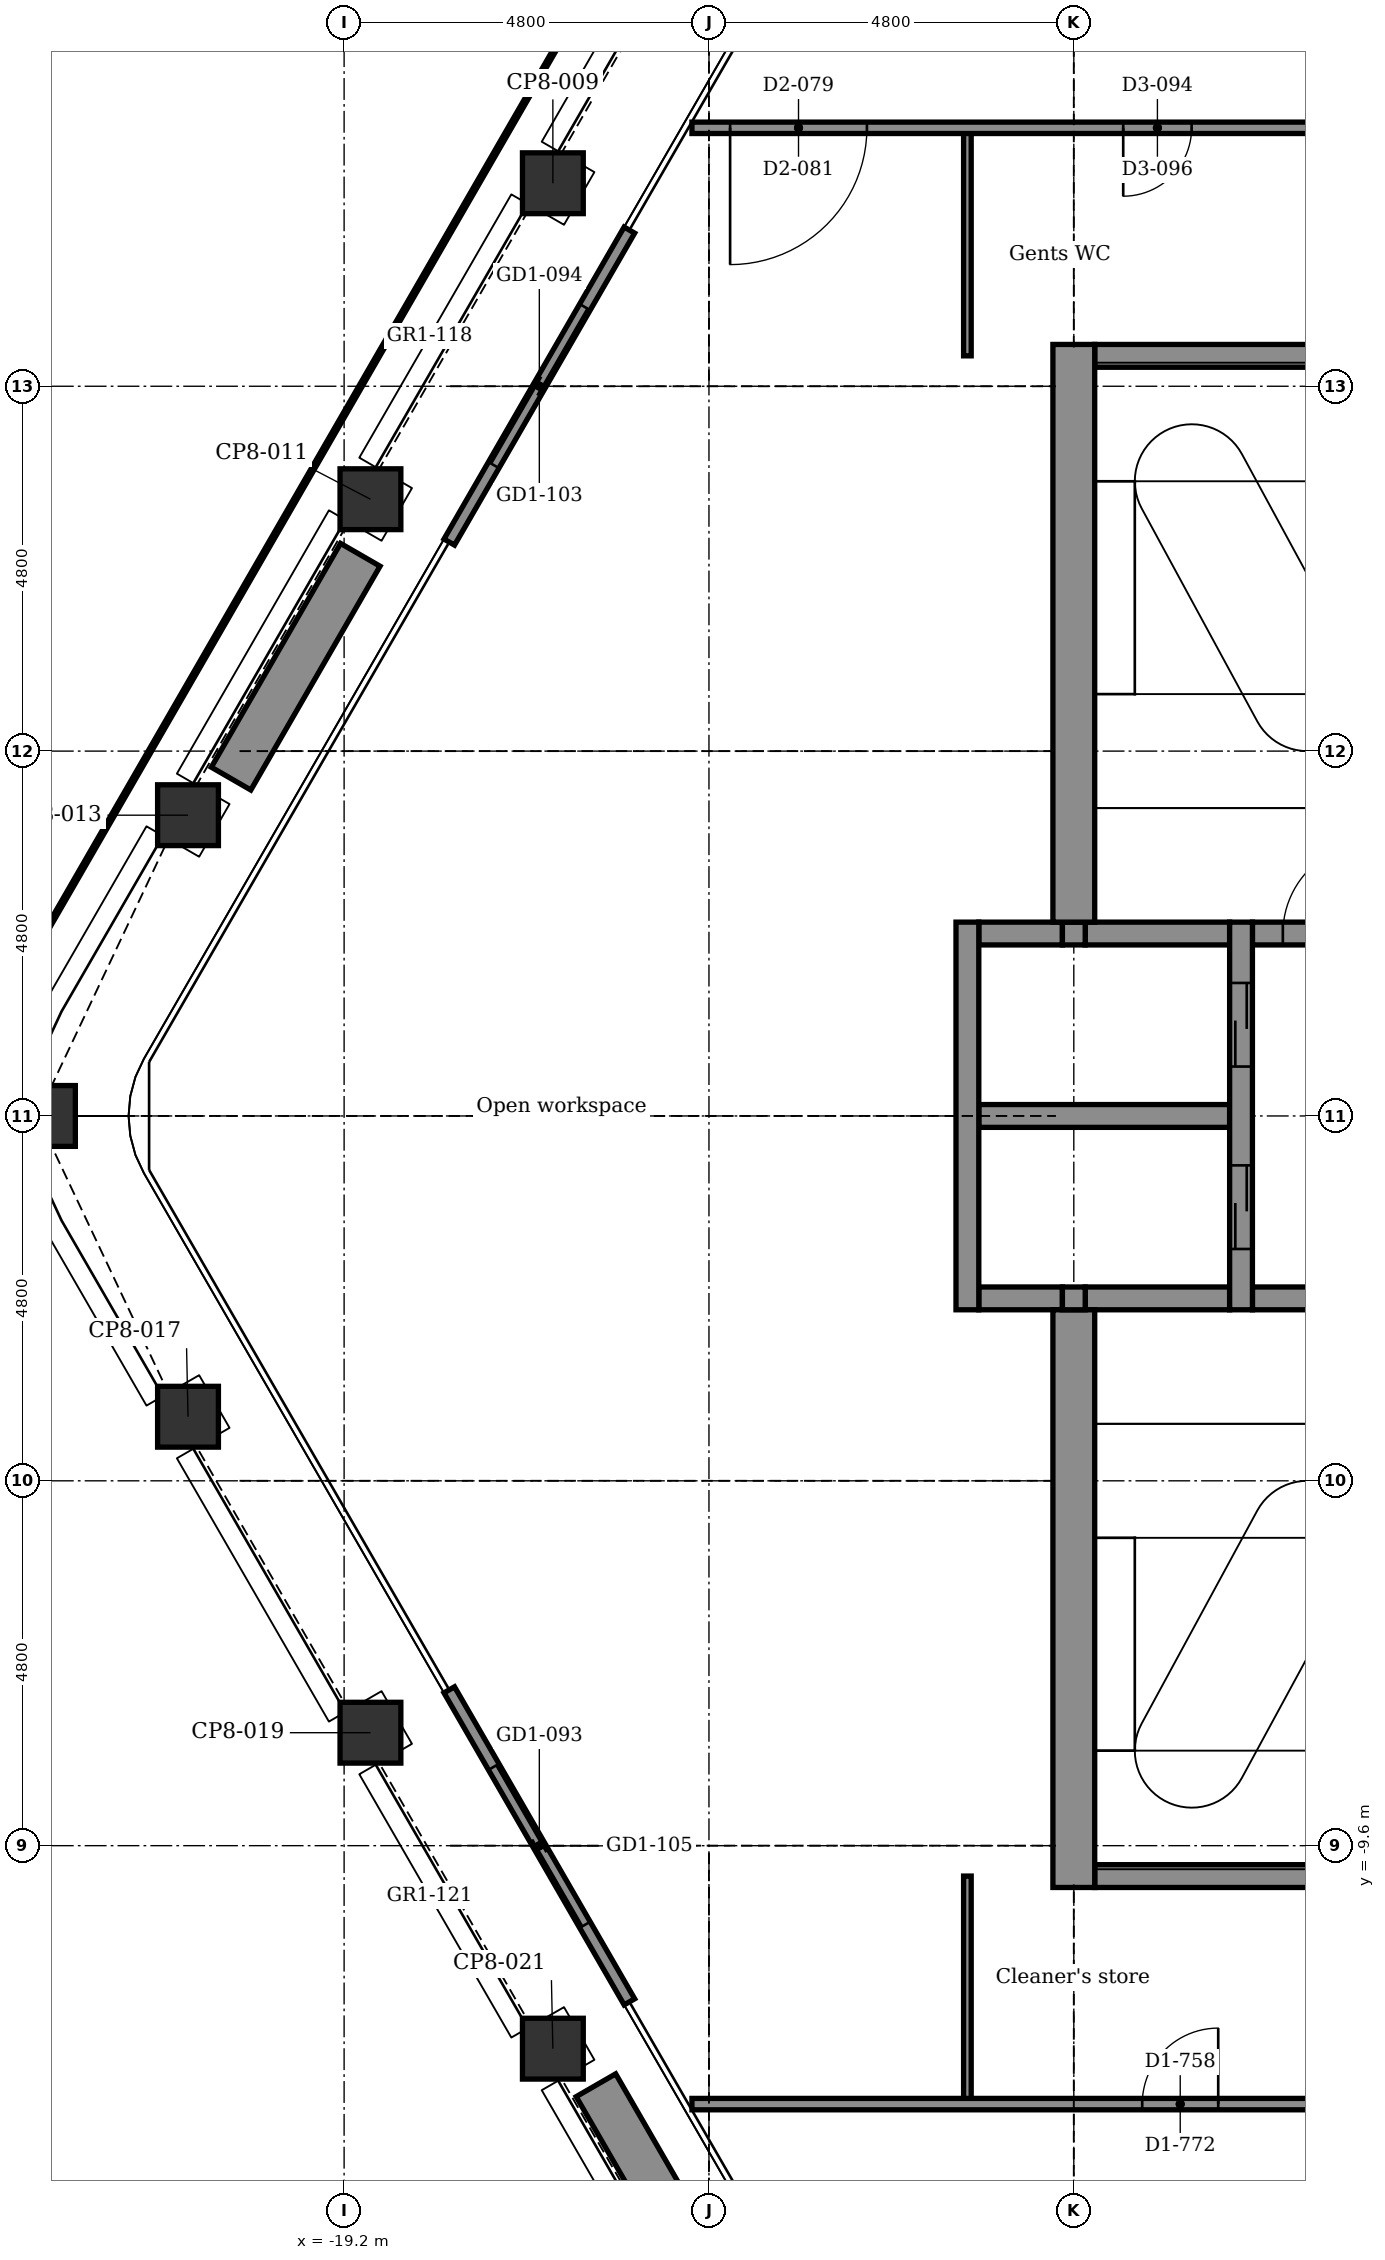
"""IFC4 building model, lengths in metres.
Left out: names, types, materials, properties, quantities, classifications, styles, units other than length and angle.
Written with IfcOpenShell. Run it as: python <this file> out.ifc"""

import sys

from ifc_helpers import new_model, si_unit, direction, frame, frame_2d, origin, origin_2d, place, context, subcontext, project, spatial, rectangle, extrude, element, fill, save


model = new_model("IFC4")
c1 = context("Model", 3, precision=1e-05, world=origin(), true_north=direction((0.0, 1.0)))
c2 = subcontext(c1, "Body", "Model", "MODEL_VIEW")
j1 = project(units=[si_unit("LENGTHUNIT", "METRE"), si_unit("PLANEANGLEUNIT", "RADIAN")], contexts=[c1])
p1 = place(None, origin())
s1 = spatial("IfcSite", under=j1, at=p1, CompositionType="ELEMENT")
p2 = place(p1, origin())
s2 = spatial("IfcBuilding", under=s1, at=p2, CompositionType="ELEMENT")
p3 = place(p2, frame((0.0, 0.0, 289.1)))
s3 = spatial("IfcBuildingStorey", under=s2, at=p3, CompositionType="ELEMENT", Elevation=289.1)
for number, where, z_axis, x_axis in (
    (1, (-16.454, -12.271, -0.15), (0.0, 0.0, 1.0), (0.866, 0.5, 0.0)),
    (2, (-18.854, -8.114, -0.15), (0.0, 0.0, 1.0), (0.866, 0.5, 0.0)),
    (3, (-21.254, -3.957, -0.15), (0.0, 0.0, 1.0), (0.866, 0.5, 0.0)),
    (4, (-23.136, 0.0, -0.15), (0.0, 0.0, 1.0), (1.0, 0.0, 0.0)),
    (5, (-21.254, 3.957, -0.15), (0.0, 0.0, 1.0), (0.5, 0.866, 0.0)),
    (6, (-18.854, 8.114, -0.15), (0.0, 0.0, 1.0), (0.5, 0.866, 0.0)),
    (7, (-16.454, 12.271, -0.15), (0.0, 0.0, 1.0), (0.5, 0.866, 0.0)),
):
    element("IfcColumn", number, at=place(p3, frame(where, z_axis=z_axis, x_axis=x_axis)), inside=s3, PredefinedType="COLUMN", context=c2, shape_type="SweptSolid", body=[
        extrude(rectangle(XDim=0.8, YDim=0.8, at=origin_2d()), origin(), (0.0, 0.0, 1.0), 3.9),
    ])
p4 = place(p3, frame((-9.325, -10.0, -0.15), z_axis=(0.0, 0.0, 1.0), x_axis=(1.0, 0.0, 0.0)))
e8 = element("IfcWall", 8, at=p4, inside=s3, PredefinedType="STANDARD", context=c2, shape_type="SweptSolid", body=[
    extrude(rectangle(XDim=4.075, YDim=0.3, at=frame_2d((2.038, 0.0))), origin(), (0.0, 0.0, 1.0), 3.9),
])
p5 = place(p3, frame((-10.85, -2.4, -0.15), z_axis=(0.0, 0.0, 1.0), x_axis=(1.0, 0.0, 0.0)))
e9 = element("IfcWall", 9, at=p5, inside=s3, PredefinedType="STANDARD", context=c2, shape_type="SweptSolid", body=[
    extrude(rectangle(XDim=1.1, YDim=0.3, at=frame_2d((0.55, 0.0))), origin(), (0.0, 0.0, 1.0), 3.9),
])
p6 = place(p3, frame((-9.45, -2.4, -0.15), z_axis=(0.0, 0.0, 1.0), x_axis=(1.0, 0.0, 0.0)))
e10 = element("IfcWall", 10, at=p6, inside=s3, PredefinedType="STANDARD", context=c2, shape_type="SweptSolid", body=[
    extrude(rectangle(XDim=1.9, YDim=0.3, at=frame_2d((0.95, 0.0))), origin(), (0.0, 0.0, 1.0), 3.9),
])
p7 = place(p3, frame((-7.25, -2.4, -0.15), z_axis=(0.0, 0.0, 1.0), x_axis=(1.0, 0.0, 0.0)))
e11 = element("IfcWall", 11, at=p7, inside=s3, PredefinedType="STANDARD", context=c2, shape_type="SweptSolid", body=[
    extrude(rectangle(XDim=2.0, YDim=0.3, at=frame_2d((1.0, 0.0))), origin(), (0.0, 0.0, 1.0), 3.9),
])
p8 = place(p3, frame((-10.85, 0.0, -0.15), z_axis=(0.0, 0.0, 1.0), x_axis=(1.0, 0.0, 0.0)))
e12 = element("IfcWall", 12, at=p8, inside=s3, PredefinedType="STANDARD", context=c2, shape_type="SweptSolid", body=[
    extrude(rectangle(XDim=3.3, YDim=0.3, at=frame_2d((1.65, 0.0))), origin(), (0.0, 0.0, 1.0), 3.9),
])
p9 = place(p3, frame((-10.85, 2.4, -0.15), z_axis=(0.0, 0.0, 1.0), x_axis=(1.0, 0.0, 0.0)))
e13 = element("IfcWall", 13, at=p9, inside=s3, PredefinedType="STANDARD", context=c2, shape_type="SweptSolid", body=[
    extrude(rectangle(XDim=1.1, YDim=0.3, at=frame_2d((0.55, 0.0))), origin(), (0.0, 0.0, 1.0), 3.9),
])
p10 = place(p3, frame((-9.45, 2.4, -0.15), z_axis=(0.0, 0.0, 1.0), x_axis=(1.0, 0.0, 0.0)))
e14 = element("IfcWall", 14, at=p10, inside=s3, PredefinedType="STANDARD", context=c2, shape_type="SweptSolid", body=[
    extrude(rectangle(XDim=1.9, YDim=0.3, at=frame_2d((0.95, 0.0))), origin(), (0.0, 0.0, 1.0), 3.9),
])
p11 = place(p3, frame((-7.25, 2.4, -0.15), z_axis=(0.0, 0.0, 1.0), x_axis=(1.0, 0.0, 0.0)))
e15 = element("IfcWall", 15, at=p11, inside=s3, PredefinedType="STANDARD", context=c2, shape_type="SweptSolid", body=[
    extrude(rectangle(XDim=2.0, YDim=0.3, at=frame_2d((1.0, 0.0))), origin(), (0.0, 0.0, 1.0), 3.9),
])
p12 = place(p11, frame((0.4, 0.0, 0.15)))
e16 = element("IfcOpeningElement", 16, at=p12, cuts=e15, PredefinedType="OPENING", context=c2, shape_type="SweptSolid", body=[
    extrude(rectangle(XDim=1.2, YDim=2.1, at=frame_2d((0.6, 1.05))), frame((0.0, 0.16, 0.0), z_axis=(0.0, -1.0, 0.0), x_axis=(1.0, 0.0, 0.0)), (0.0, 0.0, 1.0), 0.32),
])
p13 = place(p3, frame((-9.325, 10.0, -0.15), z_axis=(0.0, 0.0, 1.0), x_axis=(1.0, 0.0, 0.0)))
e17 = element("IfcWall", 17, at=p13, inside=s3, PredefinedType="STANDARD", context=c2, shape_type="SweptSolid", body=[
    extrude(rectangle(XDim=4.075, YDim=0.3, at=frame_2d((2.038, 0.0))), origin(), (0.0, 0.0, 1.0), 3.9),
])
p14 = place(p3, frame((-11.0, -2.55, -0.15), z_axis=(0.0, 0.0, 1.0), x_axis=(0.0, 1.0, 0.0)))
e18 = element("IfcWall", 18, at=p14, inside=s3, PredefinedType="STANDARD", context=c2, shape_type="SweptSolid", body=[
    extrude(rectangle(XDim=5.1, YDim=0.3, at=frame_2d((2.55, 0.0))), origin(), (0.0, 0.0, 1.0), 3.9),
])
p15 = place(p3, frame((-9.6, -10.15, -0.15), z_axis=(0.0, 0.0, 1.0), x_axis=(0.0, 1.0, 0.0)))
e19 = element("IfcWall", 19, at=p15, inside=s3, PredefinedType="SHEAR", context=c2, shape_type="SweptSolid", body=[
    extrude(rectangle(XDim=7.6, YDim=0.55, at=frame_2d((3.8, 0.0))), origin(), (0.0, 0.0, 1.0), 3.9),
])
for number, where, z_axis, x_axis in (
    (20, (-9.6, -2.55, -0.15), (0.0, 0.0, 1.0), (0.0, 1.0, 0.0)),
    (21, (-9.6, 2.25, -0.15), (0.0, 0.0, 1.0), (0.0, 1.0, 0.0)),
):
    element("IfcWall", number, at=place(p3, frame(where, z_axis=z_axis, x_axis=x_axis)), inside=s3, PredefinedType="STANDARD", context=c2, shape_type="SweptSolid", body=[
        extrude(rectangle(XDim=0.3, YDim=0.3, at=frame_2d((0.15, 0.0))), origin(), (0.0, 0.0, 1.0), 3.9),
    ])
p16 = place(p3, frame((-9.6, 2.55, -0.15), z_axis=(0.0, 0.0, 1.0), x_axis=(0.0, 1.0, 0.0)))
e22 = element("IfcWall", 22, at=p16, inside=s3, PredefinedType="SHEAR", context=c2, shape_type="SweptSolid", body=[
    extrude(rectangle(XDim=7.6, YDim=0.55, at=frame_2d((3.8, 0.0))), origin(), (0.0, 0.0, 1.0), 3.9),
])
p17 = place(p3, frame((-7.4, -2.55, -0.15), z_axis=(0.0, 0.0, 1.0), x_axis=(0.0, 1.0, 0.0)))
e23 = element("IfcWall", 23, at=p17, inside=s3, PredefinedType="STANDARD", context=c2, shape_type="SweptSolid", body=[
    extrude(rectangle(XDim=5.1, YDim=0.3, at=frame_2d((2.55, 0.0))), origin(), (0.0, 0.0, 1.0), 3.9),
])
p18 = place(p17, frame((0.8, 0.0, 0.15)))
e24 = element("IfcOpeningElement", 24, at=p18, cuts=e23, PredefinedType="OPENING", context=c2, shape_type="SweptSolid", body=[
    extrude(rectangle(XDim=1.1, YDim=2.1, at=frame_2d((0.55, 1.05))), frame((0.0, 0.16, 0.0), z_axis=(0.0, -1.0, 0.0), x_axis=(1.0, 0.0, 0.0)), (0.0, 0.0, 1.0), 0.32),
])
p19 = place(p17, frame((3.2, 0.0, 0.15)))
e25 = element("IfcOpeningElement", 25, at=p19, cuts=e23, PredefinedType="OPENING", context=c2, shape_type="SweptSolid", body=[
    extrude(rectangle(XDim=1.1, YDim=2.1, at=frame_2d((0.55, 1.05))), frame((0.0, 0.16, 0.0), z_axis=(0.0, -1.0, 0.0), x_axis=(1.0, 0.0, 0.0)), (0.0, 0.0, 1.0), 0.32),
])
p20 = place(p3, frame((-15.447, -11.655, 0.0), z_axis=(0.0, 0.0, 1.0), x_axis=(-0.499978080042, 0.866038058908, 0.0)))
e26 = element("IfcWall", 26, at=p20, inside=s3, PredefinedType="PARTITIONING", context=c2, shape_type="SweptSolid", body=[
    extrude(rectangle(XDim=4.74, YDim=0.16, at=frame_2d((2.37, 0.0))), origin(), (0.0, 0.0, 1.0), 3.75),
])
p21 = place(p20, frame((1.17, 0.0, 0.0)))
e27 = element("IfcOpeningElement", 27, at=p21, cuts=e26, PredefinedType="OPENING", context=c2, shape_type="SweptSolid", body=[
    extrude(rectangle(XDim=2.4, YDim=2.4, at=frame_2d((1.2, 1.2))), frame((0.0, 0.09, 0.0), z_axis=(0.0, -1.0, 0.0), x_axis=(1.0, 0.0, 0.0)), (0.0, 0.0, 1.0), 0.18),
])
p22 = place(p3, frame((-17.817, 7.55, 0.0), z_axis=(0.0, 0.0, 1.0), x_axis=(0.499978080042, 0.866038058908, 0.0)))
e28 = element("IfcWall", 28, at=p22, inside=s3, PredefinedType="PARTITIONING", context=c2, shape_type="SweptSolid", body=[
    extrude(rectangle(XDim=4.74, YDim=0.16, at=frame_2d((2.37, 0.0))), origin(), (0.0, 0.0, 1.0), 3.75),
])
p23 = place(p22, frame((1.17, 0.0, 0.0)))
e29 = element("IfcOpeningElement", 29, at=p23, cuts=e28, PredefinedType="OPENING", context=c2, shape_type="SweptSolid", body=[
    extrude(rectangle(XDim=2.4, YDim=2.4, at=frame_2d((1.2, 1.2))), frame((0.0, 0.09, 0.0), z_axis=(0.0, -1.0, 0.0), x_axis=(1.0, 0.0, 0.0)), (0.0, 0.0, 1.0), 0.18),
])
p24 = place(p3, frame((-14.187, -15.697, 0.0), z_axis=(0.0, 0.0, 1.0), x_axis=(-0.499977295307, 0.866038511948, 0.0)))
e30 = element("IfcWall", 30, at=p24, inside=s3, PredefinedType="USERDEFINED", context=c2, shape_type="SweptSolid", body=[
    extrude(rectangle(XDim=3.4, YDim=0.6, at=frame_2d((1.7, 0.0))), origin(), (0.0, 0.0, 1.0), 0.7),
])
p25 = place(p3, frame((-20.687, 4.438, 0.0), z_axis=(0.0, 0.0, 1.0), x_axis=(0.500008388397, 0.866020560687, 0.0)))
e31 = element("IfcWall", 31, at=p25, inside=s3, PredefinedType="USERDEFINED", context=c2, shape_type="SweptSolid", body=[
    extrude(rectangle(XDim=3.4, YDim=0.6, at=frame_2d((1.7, 0.0))), origin(), (0.0, 0.0, 1.0), 0.7),
])
for number, where, z_axis, x_axis in (
    (32, (-11.0, -13.0, 0.0), (0.0, 0.0, 1.0), (0.0, 1.0, 0.0)),
    (33, (-11.0, 10.0, 0.0), (0.0, 0.0, 1.0), (0.0, 1.0, 0.0)),
):
    element("IfcWall", number, at=place(p3, frame(where, z_axis=z_axis, x_axis=x_axis)), inside=s3, PredefinedType="PARTITIONING", context=c2, shape_type="SweptSolid", body=[
        extrude(rectangle(XDim=3.0, YDim=0.1, at=frame_2d((1.5, 0.0))), origin(), (0.0, 0.0, 1.0), 3.75),
    ])
p26 = place(p3, frame((-14.624, -13.0, 0.0), z_axis=(0.0, 0.0, 1.0), x_axis=(1.0, 0.0, 0.0)))
e34 = element("IfcWall", 34, at=p26, inside=s3, PredefinedType="PARTITIONING", context=c2, shape_type="SweptSolid", body=[
    extrude(rectangle(XDim=9.224, YDim=0.15, at=frame_2d((4.612, 0.0))), origin(), (0.0, 0.0, 1.0), 3.75),
])
p27 = place(p26, frame((5.924, 0.0, 0.0)))
e35 = element("IfcOpeningElement", 35, at=p27, cuts=e34, PredefinedType="OPENING", context=c2, shape_type="SweptSolid", body=[
    extrude(rectangle(XDim=1.0, YDim=2.1, at=frame_2d((0.5, 1.05))), frame((0.0, 0.085, 0.0), z_axis=(0.0, -1.0, 0.0), x_axis=(1.0, 0.0, 0.0)), (0.0, 0.0, 1.0), 0.17),
])
p28 = place(p3, frame((-14.624, 13.0, 0.0), z_axis=(0.0, 0.0, 1.0), x_axis=(1.0, 0.0, 0.0)))
e36 = element("IfcWall", 36, at=p28, inside=s3, PredefinedType="PARTITIONING", context=c2, shape_type="SweptSolid", body=[
    extrude(rectangle(XDim=8.624, YDim=0.15, at=frame_2d((4.312, 0.0))), origin(), (0.0, 0.0, 1.0), 3.75),
])
p29 = place(p28, frame((5.674, 0.0, 0.0)))
e37 = element("IfcOpeningElement", 37, at=p29, cuts=e36, PredefinedType="OPENING", context=c2, shape_type="SweptSolid", body=[
    extrude(rectangle(XDim=0.9, YDim=2.1, at=frame_2d((0.45, 1.05))), frame((0.0, 0.085, 0.0), z_axis=(0.0, -1.0, 0.0), x_axis=(1.0, 0.0, 0.0)), (0.0, 0.0, 1.0), 0.17),
])
p30 = place(p28, frame((0.502, 0.0, 0.0)))
e38 = element("IfcOpeningElement", 38, at=p30, cuts=e36, PredefinedType="OPENING", context=c2, shape_type="SweptSolid", body=[
    extrude(rectangle(XDim=1.8, YDim=2.1, at=frame_2d((0.9, 1.05))), frame((0.0, 0.085, 0.0), z_axis=(0.0, -1.0, 0.0), x_axis=(1.0, 0.0, 0.0)), (0.0, 0.0, 1.0), 0.17),
])
p31 = place(p21, origin())
e39 = element("IfcDoor", 39, at=p31, inside=s3, OperationType="DOUBLE_DOOR_SLIDING", PredefinedType="DOOR", context=c2, shape_type="SweptSolid", body=[
    extrude(rectangle(XDim=2.4, YDim=2.4, at=frame_2d((1.2, 1.2))), frame((0.0, 0.025, 0.0), z_axis=(0.0, -1.0, 0.0), x_axis=(1.0, 0.0, 0.0)), (0.0, 0.0, 1.0), 0.05),
])
fill(e27, e39)
p32 = place(p23, origin())
e40 = element("IfcDoor", 40, at=p32, inside=s3, OperationType="DOUBLE_DOOR_SLIDING", PredefinedType="DOOR", context=c2, shape_type="SweptSolid", body=[
    extrude(rectangle(XDim=2.4, YDim=2.4, at=frame_2d((1.2, 1.2))), frame((0.0, 0.025, 0.0), z_axis=(0.0, -1.0, 0.0), x_axis=(1.0, 0.0, 0.0)), (0.0, 0.0, 1.0), 0.05),
])
fill(e29, e40)
p33 = place(p29, frame((0.9, 0.0, 0.0), z_axis=(0.0, 0.0, 1.0), x_axis=(-1.0, 0.0, 0.0)))
e41 = element("IfcDoor", 41, at=p33, inside=s3, OperationType="SINGLE_SWING_LEFT", PredefinedType="DOOR", context=c2, shape_type="SweptSolid", body=[
    extrude(rectangle(XDim=0.9, YDim=2.1, at=frame_2d((0.45, 1.05))), frame((0.0, 0.025, 0.0), z_axis=(0.0, -1.0, 0.0), x_axis=(1.0, 0.0, 0.0)), (0.0, 0.0, 1.0), 0.05),
])
fill(e37, e41)
p34 = place(p27, origin())
e42 = element("IfcDoor", 42, at=p34, inside=s3, OperationType="SINGLE_SWING_RIGHT", PredefinedType="DOOR", context=c2, shape_type="SweptSolid", body=[
    extrude(rectangle(XDim=1.0, YDim=2.1, at=frame_2d((0.5, 1.05))), frame((0.0, 0.025, 0.0), z_axis=(0.0, -1.0, 0.0), x_axis=(1.0, 0.0, 0.0)), (0.0, 0.0, 1.0), 0.05),
])
fill(e35, e42)
p35 = place(p30, frame((1.8, 0.0, 0.0), z_axis=(0.0, 0.0, 1.0), x_axis=(-1.0, 0.0, 0.0)))
e43 = element("IfcDoor", 43, at=p35, inside=s3, OperationType="SINGLE_SWING_LEFT", PredefinedType="DOOR", context=c2, shape_type="SweptSolid", body=[
    extrude(rectangle(XDim=1.8, YDim=2.1, at=frame_2d((0.9, 1.05))), frame((0.0, 0.025, 0.0), z_axis=(0.0, -1.0, 0.0), x_axis=(1.0, 0.0, 0.0)), (0.0, 0.0, 1.0), 0.05),
])
fill(e38, e43)
p36 = place(p18, origin())
e44 = element("IfcDoor", 44, at=p36, inside=s3, OperationType="DOUBLE_DOOR_SLIDING", PredefinedType="DOOR", context=c2, shape_type="SweptSolid", body=[
    extrude(rectangle(XDim=1.1, YDim=2.1, at=frame_2d((0.55, 1.05))), frame((0.0, 0.025, 0.0), z_axis=(0.0, -1.0, 0.0), x_axis=(1.0, 0.0, 0.0)), (0.0, 0.0, 1.0), 0.05),
])
fill(e24, e44)
p37 = place(p19, origin())
e45 = element("IfcDoor", 45, at=p37, inside=s3, OperationType="DOUBLE_DOOR_SLIDING", PredefinedType="DOOR", context=c2, shape_type="SweptSolid", body=[
    extrude(rectangle(XDim=1.1, YDim=2.1, at=frame_2d((0.55, 1.05))), frame((0.0, 0.025, 0.0), z_axis=(0.0, -1.0, 0.0), x_axis=(1.0, 0.0, 0.0)), (0.0, 0.0, 1.0), 0.05),
])
fill(e25, e45)
p38 = place(p12, origin())
e46 = element("IfcDoor", 46, at=p38, inside=s3, OperationType="SINGLE_SWING_RIGHT", PredefinedType="DOOR", context=c2, shape_type="SweptSolid", body=[
    extrude(rectangle(XDim=1.2, YDim=2.1, at=frame_2d((0.6, 1.05))), frame((0.0, 0.025, 0.0), z_axis=(0.0, -1.0, 0.0), x_axis=(1.0, 0.0, 0.0)), (0.0, 0.0, 1.0), 0.05),
])
fill(e16, e46)
save(model, sys.argv[1])
